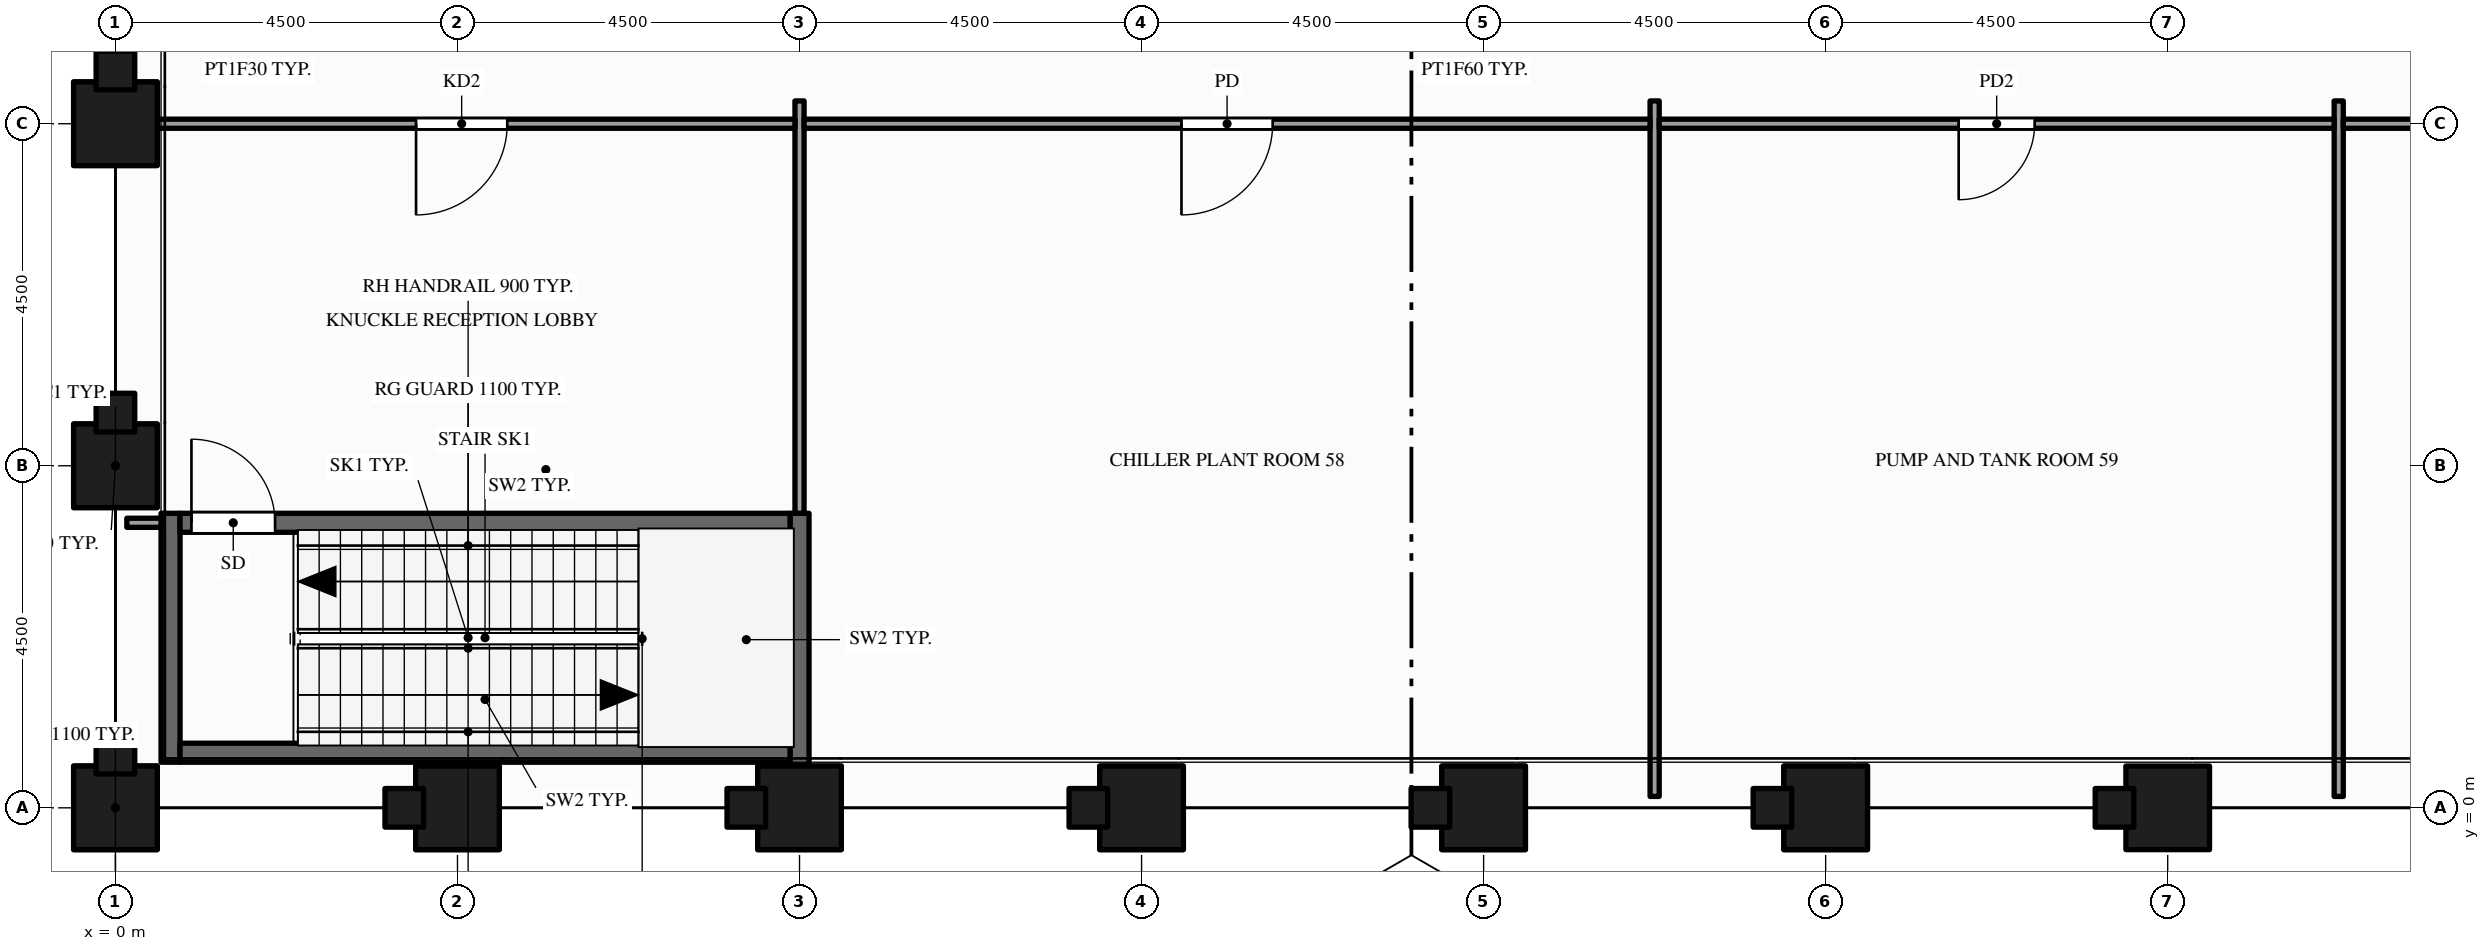
"""IFC4 building model, lengths in metres.
Left out: names, types, materials, properties, quantities, classifications, styles, units other than length and angle.
Written with IfcOpenShell. Run it as: python <this file> out.ifc"""

import sys

from ifc_helpers import new_model, si_unit, direction, frame, frame_2d, origin, origin_2d, place, context, subcontext, project, spatial, rectangle, hollow_rectangle, extrude, element, fill, save


model = new_model("IFC4")
c1 = context("Model", 3, precision=1e-05, world=origin(), true_north=direction((0.0, 1.0)))
c2 = subcontext(c1, "Body", "Model", "MODEL_VIEW")
j1 = project(units=[si_unit("LENGTHUNIT", "METRE"), si_unit("PLANEANGLEUNIT", "RADIAN")], contexts=[c1])
p1 = place(None, origin())
s1 = spatial("IfcSite", under=j1, at=p1, CompositionType="ELEMENT")
p2 = place(p1, origin())
s2 = spatial("IfcBuilding", under=s1, at=p2, CompositionType="ELEMENT")
p3 = place(p2, frame((0.0, 0.0, 77.0)))
s3 = spatial("IfcBuildingStorey", under=s2, at=p3, CompositionType="ELEMENT", Elevation=77.0)
p4 = place(p3, frame((0.0, 0.0, -0.25), z_axis=(0.0, 0.0, 1.0), x_axis=(1.0, 0.0, 0.0)))
e1 = element("IfcColumn", 1, at=p4, inside=s3, PredefinedType="COLUMN", context=c2, shape_type="SweptSolid", body=[
    extrude(hollow_rectangle(XDim=1.1, YDim=1.1, WallThickness=0.06, at=origin_2d()), origin(), (0.0, 0.0, 1.0), 4.6),
])
p5 = place(p3, frame((0.0, 0.0, 4.35), z_axis=(0.0, 0.0, 1.0), x_axis=(1.0, 0.0, 0.0)))
e2 = element("IfcColumn", 2, at=p5, inside=s3, PredefinedType="COLUMN", context=c2, shape_type="SweptSolid", body=[
    extrude(rectangle(XDim=1.1, YDim=1.1, at=origin_2d()), origin(), (0.0, 0.0, 1.0), 1.5),
])
p6 = place(p3, frame((0.0, 4.5, -0.25), z_axis=(0.0, 0.0, 1.0), x_axis=(1.0, 0.0, 0.0)))
e3 = element("IfcColumn", 3, at=p6, inside=s3, PredefinedType="COLUMN", context=c2, shape_type="SweptSolid", body=[
    extrude(hollow_rectangle(XDim=1.1, YDim=1.1, WallThickness=0.06, at=origin_2d()), origin(), (0.0, 0.0, 1.0), 4.6),
])
p7 = place(p3, frame((0.0, 4.5, 4.35), z_axis=(0.0, 0.0, 1.0), x_axis=(1.0, 0.0, 0.0)))
e4 = element("IfcColumn", 4, at=p7, inside=s3, PredefinedType="COLUMN", context=c2, shape_type="SweptSolid", body=[
    extrude(rectangle(XDim=1.1, YDim=1.1, at=origin_2d()), origin(), (0.0, 0.0, 1.0), 1.5),
])
p8 = place(p3, frame((0.0, 9.0, -0.25), z_axis=(0.0, 0.0, 1.0), x_axis=(1.0, 0.0, 0.0)))
e5 = element("IfcColumn", 5, at=p8, inside=s3, PredefinedType="COLUMN", context=c2, shape_type="SweptSolid", body=[
    extrude(hollow_rectangle(XDim=1.1, YDim=1.1, WallThickness=0.06, at=origin_2d()), origin(), (0.0, 0.0, 1.0), 4.6),
])
p9 = place(p3, frame((0.0, 9.0, 4.35), z_axis=(0.0, 0.0, 1.0), x_axis=(1.0, 0.0, 0.0)))
e6 = element("IfcColumn", 6, at=p9, inside=s3, PredefinedType="COLUMN", context=c2, shape_type="SweptSolid", body=[
    extrude(rectangle(XDim=1.1, YDim=1.1, at=origin_2d()), origin(), (0.0, 0.0, 1.0), 1.5),
])
p10 = place(p3, frame((4.5, 0.0, -0.25), z_axis=(0.0, 0.0, 1.0), x_axis=(1.0, 0.0, 0.0)))
e7 = element("IfcColumn", 7, at=p10, inside=s3, PredefinedType="COLUMN", context=c2, shape_type="SweptSolid", body=[
    extrude(hollow_rectangle(XDim=1.1, YDim=1.1, WallThickness=0.06, at=origin_2d()), origin(), (0.0, 0.0, 1.0), 4.6),
])
p11 = place(p3, frame((4.5, 0.0, 4.35), z_axis=(0.0, 0.0, 1.0), x_axis=(1.0, 0.0, 0.0)))
e8 = element("IfcColumn", 8, at=p11, inside=s3, PredefinedType="COLUMN", context=c2, shape_type="SweptSolid", body=[
    extrude(rectangle(XDim=1.1, YDim=1.1, at=origin_2d()), origin(), (0.0, 0.0, 1.0), 1.5),
])
p12 = place(p3, frame((9.0, 0.0, -0.25), z_axis=(0.0, 0.0, 1.0), x_axis=(1.0, 0.0, 0.0)))
e9 = element("IfcColumn", 9, at=p12, inside=s3, PredefinedType="COLUMN", context=c2, shape_type="SweptSolid", body=[
    extrude(hollow_rectangle(XDim=1.1, YDim=1.1, WallThickness=0.06, at=origin_2d()), origin(), (0.0, 0.0, 1.0), 4.6),
])
p13 = place(p3, frame((9.0, 0.0, 4.35), z_axis=(0.0, 0.0, 1.0), x_axis=(1.0, 0.0, 0.0)))
e10 = element("IfcColumn", 10, at=p13, inside=s3, PredefinedType="COLUMN", context=c2, shape_type="SweptSolid", body=[
    extrude(rectangle(XDim=1.1, YDim=1.1, at=origin_2d()), origin(), (0.0, 0.0, 1.0), 1.5),
])
p14 = place(p3, frame((13.5, 0.0, -0.25), z_axis=(0.0, 0.0, 1.0), x_axis=(1.0, 0.0, 0.0)))
e11 = element("IfcColumn", 11, at=p14, inside=s3, PredefinedType="COLUMN", context=c2, shape_type="SweptSolid", body=[
    extrude(hollow_rectangle(XDim=1.1, YDim=1.1, WallThickness=0.06, at=origin_2d()), origin(), (0.0, 0.0, 1.0), 4.6),
])
p15 = place(p3, frame((13.5, 0.0, 4.35), z_axis=(0.0, 0.0, 1.0), x_axis=(1.0, 0.0, 0.0)))
e12 = element("IfcColumn", 12, at=p15, inside=s3, PredefinedType="COLUMN", context=c2, shape_type="SweptSolid", body=[
    extrude(rectangle(XDim=1.1, YDim=1.1, at=origin_2d()), origin(), (0.0, 0.0, 1.0), 1.5),
])
p16 = place(p3, frame((18.0, 0.0, -0.25), z_axis=(0.0, 0.0, 1.0), x_axis=(1.0, 0.0, 0.0)))
e13 = element("IfcColumn", 13, at=p16, inside=s3, PredefinedType="COLUMN", context=c2, shape_type="SweptSolid", body=[
    extrude(hollow_rectangle(XDim=1.1, YDim=1.1, WallThickness=0.06, at=origin_2d()), origin(), (0.0, 0.0, 1.0), 4.6),
])
p17 = place(p3, frame((18.0, 0.0, 4.35), z_axis=(0.0, 0.0, 1.0), x_axis=(1.0, 0.0, 0.0)))
e14 = element("IfcColumn", 14, at=p17, inside=s3, PredefinedType="COLUMN", context=c2, shape_type="SweptSolid", body=[
    extrude(rectangle(XDim=1.1, YDim=1.1, at=origin_2d()), origin(), (0.0, 0.0, 1.0), 1.5),
])
p18 = place(p3, frame((22.5, 0.0, -0.25), z_axis=(0.0, 0.0, 1.0), x_axis=(1.0, 0.0, 0.0)))
e15 = element("IfcColumn", 15, at=p18, inside=s3, PredefinedType="COLUMN", context=c2, shape_type="SweptSolid", body=[
    extrude(hollow_rectangle(XDim=1.1, YDim=1.1, WallThickness=0.06, at=origin_2d()), origin(), (0.0, 0.0, 1.0), 4.6),
])
p19 = place(p3, frame((22.5, 0.0, 4.35), z_axis=(0.0, 0.0, 1.0), x_axis=(1.0, 0.0, 0.0)))
e16 = element("IfcColumn", 16, at=p19, inside=s3, PredefinedType="COLUMN", context=c2, shape_type="SweptSolid", body=[
    extrude(rectangle(XDim=1.1, YDim=1.1, at=origin_2d()), origin(), (0.0, 0.0, 1.0), 1.5),
])
p20 = place(p3, frame((27.0, 0.0, -0.25), z_axis=(0.0, 0.0, 1.0), x_axis=(1.0, 0.0, 0.0)))
e17 = element("IfcColumn", 17, at=p20, inside=s3, PredefinedType="COLUMN", context=c2, shape_type="SweptSolid", body=[
    extrude(hollow_rectangle(XDim=1.1, YDim=1.1, WallThickness=0.06, at=origin_2d()), origin(), (0.0, 0.0, 1.0), 6.1),
])
p21 = place(p3, frame((0.725, 0.6, 0.0), z_axis=(0.0, 0.0, 1.0), x_axis=(0.0, 1.0, 0.0)))
e18 = element("IfcWall", 18, at=p21, inside=s3, PredefinedType="SHEAR", context=c2, shape_type="SweptSolid", body=[
    extrude(rectangle(XDim=3.275, YDim=0.25, at=frame_2d((1.637, 0.0))), origin(), (0.0, 0.0, 1.0), 5.85),
])
p22 = place(p3, frame((9.0, 0.15, 0.0), z_axis=(0.0, 0.0, 1.0), x_axis=(0.0, 1.0, 0.0)))
e19 = element("IfcWall", 19, at=p22, inside=s3, PredefinedType="PARTITIONING", context=c2, shape_type="SweptSolid", body=[
    extrude(rectangle(XDim=0.4, YDim=0.12, at=frame_2d((0.2, 0.0))), origin(), (0.0, 0.0, 1.0), 5.85),
])
p23 = place(p3, frame((9.0, 0.55, 0.0), z_axis=(0.0, 0.0, 1.0), x_axis=(0.0, 1.0, 0.0)))
e20 = element("IfcWall", 20, at=p23, inside=s3, PredefinedType="SHEAR", context=c2, shape_type="SweptSolid", body=[
    extrude(rectangle(XDim=3.325, YDim=0.25, at=frame_2d((1.663, 0.0))), origin(), (0.0, 0.0, 1.0), 5.85),
])
p24 = place(p3, frame((9.0, 3.875, 0.0), z_axis=(0.0, 0.0, 1.0), x_axis=(0.0, 1.0, 0.0)))
e21 = element("IfcWall", 21, at=p24, inside=s3, PredefinedType="PARTITIONING", context=c2, shape_type="SweptSolid", body=[
    extrude(rectangle(XDim=5.425, YDim=0.12, at=frame_2d((2.712, 0.0))), origin(), (0.0, 0.0, 1.0), 4.938),
])
for number, where, z_axis, x_axis in (
    (22, (20.25, 0.15, 0.0), (0.0, 0.0, 1.0), (0.0, 1.0, 0.0)),
    (23, (29.25, 0.15, 0.0), (0.0, 0.0, 1.0), (0.0, 1.0, 0.0)),
):
    element("IfcWall", number, at=place(p3, frame(where, z_axis=z_axis, x_axis=x_axis)), inside=s3, PredefinedType="PARTITIONING", context=c2, shape_type="SweptSolid", body=[
        extrude(rectangle(XDim=9.15, YDim=0.12, at=frame_2d((4.575, 0.0))), origin(), (0.0, 0.0, 1.0), 4.938),
    ])
p25 = place(p3, frame((0.85, 0.725, 0.0), z_axis=(0.0, 0.0, 1.0), x_axis=(1.0, 0.0, 0.0)))
e24 = element("IfcWall", 24, at=p25, inside=s3, PredefinedType="SHEAR", context=c2, shape_type="SweptSolid", body=[
    extrude(rectangle(XDim=8.025, YDim=0.25, at=frame_2d((4.012, 0.0))), origin(), (0.0, 0.0, 1.0), 5.85),
])
p26 = place(p3, frame((0.15, 3.75, 0.0), z_axis=(0.0, 0.0, 1.0), x_axis=(1.0, 0.0, 0.0)))
e25 = element("IfcWall", 25, at=p26, inside=s3, PredefinedType="PARTITIONING", context=c2, shape_type="SweptSolid", body=[
    extrude(rectangle(XDim=0.45, YDim=0.12, at=frame_2d((0.225, 0.0))), origin(), (0.0, 0.0, 1.0), 5.85),
])
p27 = place(p3, frame((0.85, 3.75, 0.0), z_axis=(0.0, 0.0, 1.0), x_axis=(1.0, 0.0, 0.0)))
e26 = element("IfcWall", 26, at=p27, inside=s3, PredefinedType="SHEAR", context=c2, shape_type="SweptSolid", body=[
    extrude(rectangle(XDim=8.025, YDim=0.25, at=frame_2d((4.012, 0.0))), origin(), (0.0, 0.0, 1.0), 5.85),
])
p28 = place(p27, frame((0.15, 0.0, 0.0)))
e27 = element("IfcOpeningElement", 27, at=p28, cuts=e26, PredefinedType="OPENING", context=c2, shape_type="SweptSolid", body=[
    extrude(rectangle(XDim=1.1, YDim=2.1, at=frame_2d((0.55, 1.05))), frame((0.0, 0.135, 0.0), z_axis=(0.0, -1.0, 0.0), x_axis=(1.0, 0.0, 0.0)), (0.0, 0.0, 1.0), 0.27),
])
p29 = place(p3, frame((0.15, 9.0, 0.0), z_axis=(0.0, 0.0, 1.0), x_axis=(1.0, 0.0, 0.0)))
e28 = element("IfcWall", 28, at=p29, inside=s3, PredefinedType="PARTITIONING", context=c2, shape_type="SweptSolid", body=[
    extrude(rectangle(XDim=8.79, YDim=0.12, at=frame_2d((4.395, 0.0))), origin(), (0.0, 0.0, 1.0), 4.938),
])
p30 = place(p29, frame((3.805, 0.0, 0.0)))
e29 = element("IfcOpeningElement", 29, at=p30, cuts=e28, PredefinedType="OPENING", context=c2, shape_type="SweptSolid", body=[
    extrude(rectangle(XDim=1.2, YDim=2.1, at=frame_2d((0.6, 1.05))), frame((0.0, 0.07, 0.0), z_axis=(0.0, -1.0, 0.0), x_axis=(1.0, 0.0, 0.0)), (0.0, 0.0, 1.0), 0.14),
])
p31 = place(p3, frame((9.06, 9.0, 0.0), z_axis=(0.0, 0.0, 1.0), x_axis=(1.0, 0.0, 0.0)))
e30 = element("IfcWall", 30, at=p31, inside=s3, PredefinedType="PARTITIONING", context=c2, shape_type="SweptSolid", body=[
    extrude(rectangle(XDim=11.13, YDim=0.12, at=frame_2d((5.565, 0.0))), origin(), (0.0, 0.0, 1.0), 4.938),
])
p32 = place(p31, frame((4.965, 0.0, 0.0)))
e31 = element("IfcOpeningElement", 31, at=p32, cuts=e30, PredefinedType="OPENING", context=c2, shape_type="SweptSolid", body=[
    extrude(rectangle(XDim=1.2, YDim=2.1, at=frame_2d((0.6, 1.05))), frame((0.0, 0.07, 0.0), z_axis=(0.0, -1.0, 0.0), x_axis=(1.0, 0.0, 0.0)), (0.0, 0.0, 1.0), 0.14),
])
p33 = place(p3, frame((20.31, 9.0, 0.0), z_axis=(0.0, 0.0, 1.0), x_axis=(1.0, 0.0, 0.0)))
e32 = element("IfcWall", 32, at=p33, inside=s3, PredefinedType="PARTITIONING", context=c2, shape_type="SweptSolid", body=[
    extrude(rectangle(XDim=8.88, YDim=0.12, at=frame_2d((4.44, 0.0))), origin(), (0.0, 0.0, 1.0), 4.938),
])
p34 = place(p33, frame((3.94, 0.0, 0.0)))
e33 = element("IfcOpeningElement", 33, at=p34, cuts=e32, PredefinedType="OPENING", context=c2, shape_type="SweptSolid", body=[
    extrude(rectangle(XDim=1.0, YDim=2.1, at=frame_2d((0.5, 1.05))), frame((0.0, 0.07, 0.0), z_axis=(0.0, -1.0, 0.0), x_axis=(1.0, 0.0, 0.0)), (0.0, 0.0, 1.0), 0.14),
])
p35 = place(p3, frame((29.31, 9.0, 0.0), z_axis=(0.0, 0.0, 1.0), x_axis=(1.0, 0.0, 0.0)))
e34 = element("IfcWall", 34, at=p35, inside=s3, PredefinedType="PARTITIONING", context=c2, shape_type="SweptSolid", body=[
    extrude(rectangle(XDim=6.63, YDim=0.12, at=frame_2d((3.315, 0.0))), origin(), (0.0, 0.0, 1.0), 4.938),
])
p36 = place(p35, frame((2.815, 0.0, 0.0)))
e35 = element("IfcOpeningElement", 35, at=p36, cuts=e34, PredefinedType="OPENING", context=c2, shape_type="SweptSolid", body=[
    extrude(rectangle(XDim=1.0, YDim=2.1, at=frame_2d((0.5, 1.05))), frame((0.0, 0.07, 0.0), z_axis=(0.0, -1.0, 0.0), x_axis=(1.0, 0.0, 0.0)), (0.0, 0.0, 1.0), 0.14),
])
p37 = place(p28, origin())
e36 = element("IfcDoor", 36, at=p37, inside=s3, OperationType="SINGLE_SWING_LEFT", PredefinedType="DOOR", context=c2, shape_type="SweptSolid", body=[
    extrude(rectangle(XDim=1.1, YDim=2.1, at=frame_2d((0.55, 1.05))), frame((0.0, 0.025, 0.0), z_axis=(0.0, -1.0, 0.0), x_axis=(1.0, 0.0, 0.0)), (0.0, 0.0, 1.0), 0.05),
])
fill(e27, e36)
p38 = place(p30, origin())
e37 = element("IfcDoor", 37, at=p38, inside=s3, OperationType="SINGLE_SWING_LEFT", PredefinedType="DOOR", context=c2, shape_type="SweptSolid", body=[
    extrude(rectangle(XDim=1.2, YDim=2.1, at=frame_2d((0.6, 1.05))), frame((0.0, 0.025, 0.0), z_axis=(0.0, -1.0, 0.0), x_axis=(1.0, 0.0, 0.0)), (0.0, 0.0, 1.0), 0.05),
])
fill(e29, e37)
p39 = place(p32, origin())
e38 = element("IfcDoor", 38, at=p39, inside=s3, OperationType="SINGLE_SWING_LEFT", PredefinedType="DOOR", context=c2, shape_type="SweptSolid", body=[
    extrude(rectangle(XDim=1.2, YDim=2.1, at=frame_2d((0.6, 1.05))), frame((0.0, 0.025, 0.0), z_axis=(0.0, -1.0, 0.0), x_axis=(1.0, 0.0, 0.0)), (0.0, 0.0, 1.0), 0.05),
])
fill(e31, e38)
p40 = place(p34, origin())
e39 = element("IfcDoor", 39, at=p40, inside=s3, OperationType="SINGLE_SWING_LEFT", PredefinedType="DOOR", context=c2, shape_type="SweptSolid", body=[
    extrude(rectangle(XDim=1.0, YDim=2.1, at=frame_2d((0.5, 1.05))), frame((0.0, 0.025, 0.0), z_axis=(0.0, -1.0, 0.0), x_axis=(1.0, 0.0, 0.0)), (0.0, 0.0, 1.0), 0.05),
])
fill(e33, e39)
save(model, sys.argv[1])
